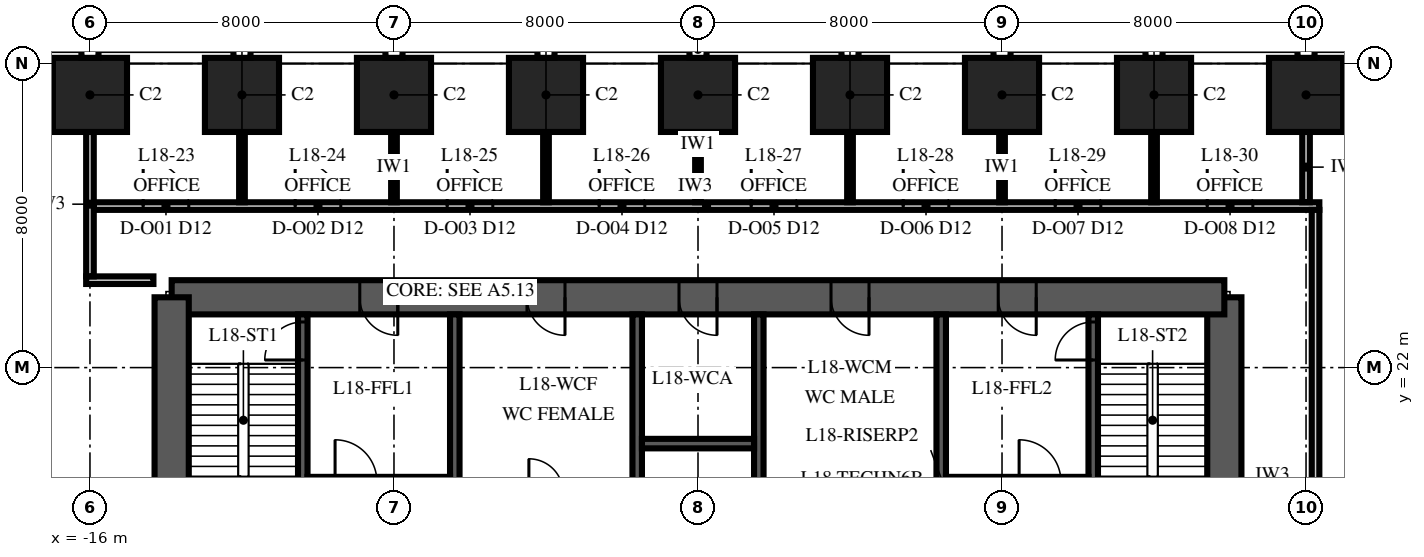
"""IFC4 building model, lengths in metres.
Left out: names, types, materials, properties, quantities, classifications, styles, units other than length and angle.
Written with IfcOpenShell. Run it as: python <this file> out.ifc"""

import sys

from ifc_helpers import new_model, si_unit, direction, frame, frame_2d, origin, origin_2d, place, context, subcontext, project, spatial, polyline, rectangle, outline, extrude, element, fill, save


model = new_model("IFC4")
c1 = context("Model", 3, precision=1e-05, world=origin(), true_north=direction((0.0, 1.0)))
c2 = subcontext(c1, "Body", "Model", "MODEL_VIEW")
j1 = project(units=[si_unit("LENGTHUNIT", "METRE"), si_unit("PLANEANGLEUNIT", "RADIAN")], contexts=[c1])
p1 = place(None, origin())
s1 = spatial("IfcSite", under=j1, at=p1, CompositionType="ELEMENT")
p2 = place(p1, origin())
s2 = spatial("IfcBuilding", under=s1, at=p2, CompositionType="ELEMENT")
p3 = place(p2, frame((0.0, 0.0, 84.0)))
s3 = spatial("IfcBuildingStorey", under=s2, at=p3, CompositionType="ELEMENT", Elevation=84.0)
for number, where, z_axis, x_axis in (
    (1, (16.0, 29.175, 0.0), (0.0, 0.0, 1.0), (-1.0, 0.0, 0.0)),
    (2, (12.0, 29.175, 0.0), (0.0, 0.0, 1.0), (-1.0, 0.0, 0.0)),
    (3, (8.0, 29.175, 0.0), (0.0, 0.0, 1.0), (-1.0, 0.0, 0.0)),
    (4, (4.0, 29.175, 0.0), (0.0, 0.0, 1.0), (-1.0, 0.0, 0.0)),
    (5, (0.0, 29.175, 0.0), (0.0, 0.0, 1.0), (-1.0, 0.0, 0.0)),
    (6, (-4.0, 29.175, 0.0), (0.0, 0.0, 1.0), (-1.0, 0.0, 0.0)),
    (7, (-8.0, 29.175, 0.0), (0.0, 0.0, 1.0), (-1.0, 0.0, 0.0)),
    (8, (-12.0, 29.175, 0.0), (0.0, 0.0, 1.0), (-1.0, 0.0, 0.0)),
    (9, (-16.0, 29.175, 0.0), (0.0, 0.0, 1.0), (-1.0, 0.0, 0.0)),
):
    element("IfcColumn", number, at=place(p3, frame(where, z_axis=z_axis, x_axis=x_axis)), inside=s3, PredefinedType="COLUMN", context=c2, shape_type="SweptSolid", body=[
        extrude(rectangle(XDim=1.95, YDim=1.95, at=origin_2d()), origin(), (0.0, 0.0, 1.0), 4.0),
    ])
p4 = place(p3, frame((13.85, 6.15, 0.0), z_axis=(0.0, 0.0, 1.0), x_axis=(0.0, 1.0, 0.0)))
e10 = element("IfcWall", 10, at=p4, inside=s3, PredefinedType="SHEAR", context=c2, shape_type="SweptSolid", body=[
    extrude(outline(polyline([(0.0, -0.45), (17.7, -0.45), (17.7, 0.0), (17.25, 0.0), (17.25, 0.45), (0.45, 0.45), (0.45, 0.0), (0.0, 0.0), (0.0, -0.45)])), origin(), (0.0, 0.0, 1.0), 4.0),
])
p5 = place(p4, frame((4.15, 0.0, 0.0)))
e11 = element("IfcOpeningElement", 11, at=p5, cuts=e10, PredefinedType="OPENING", context=c2, shape_type="SweptSolid", body=[
    extrude(rectangle(XDim=1.8, YDim=2.4, at=frame_2d((0.9, 1.2))), frame((0.0, 0.465, 0.0), z_axis=(0.0, -1.0, 0.0), x_axis=(1.0, 0.0, 0.0)), (0.0, 0.0, 1.0), 0.93),
])
p6 = place(p3, frame((13.85, 23.85, 0.0), z_axis=(0.0, 0.0, 1.0), x_axis=(-1.0, 0.0, 0.0)))
e12 = element("IfcWall", 12, at=p6, inside=s3, PredefinedType="SHEAR", context=c2, shape_type="SweptSolid", body=[
    extrude(rectangle(XDim=27.7, YDim=0.9, at=frame_2d((13.85, 0.0))), origin(), (0.0, 0.0, 1.0), 4.0),
])
p7 = place(p6, frame((21.75, 0.0, 0.0)))
e13 = element("IfcOpeningElement", 13, at=p7, cuts=e12, PredefinedType="OPENING", context=c2, shape_type="SweptSolid", body=[
    extrude(rectangle(XDim=1.0, YDim=2.1, at=frame_2d((0.5, 1.05))), frame((0.0, 0.465, 0.0), z_axis=(0.0, -1.0, 0.0), x_axis=(1.0, 0.0, 0.0)), (0.0, 0.0, 1.0), 0.93),
])
p8 = place(p6, frame((4.95, 0.0, 0.0)))
e14 = element("IfcOpeningElement", 14, at=p8, cuts=e12, PredefinedType="OPENING", context=c2, shape_type="SweptSolid", body=[
    extrude(rectangle(XDim=1.0, YDim=2.1, at=frame_2d((0.5, 1.05))), frame((0.0, 0.465, 0.0), z_axis=(0.0, -1.0, 0.0), x_axis=(1.0, 0.0, 0.0)), (0.0, 0.0, 1.0), 0.93),
])
p9 = place(p6, frame((17.35, 0.0, 0.0)))
e15 = element("IfcOpeningElement", 15, at=p9, cuts=e12, PredefinedType="OPENING", context=c2, shape_type="SweptSolid", body=[
    extrude(rectangle(XDim=1.0, YDim=2.1, at=frame_2d((0.5, 1.05))), frame((0.0, 0.465, 0.0), z_axis=(0.0, -1.0, 0.0), x_axis=(1.0, 0.0, 0.0)), (0.0, 0.0, 1.0), 0.93),
])
p10 = place(p6, frame((13.35, 0.0, 0.0)))
e16 = element("IfcOpeningElement", 16, at=p10, cuts=e12, PredefinedType="OPENING", context=c2, shape_type="SweptSolid", body=[
    extrude(rectangle(XDim=1.0, YDim=2.1, at=frame_2d((0.5, 1.05))), frame((0.0, 0.465, 0.0), z_axis=(0.0, -1.0, 0.0), x_axis=(1.0, 0.0, 0.0)), (0.0, 0.0, 1.0), 0.93),
])
p11 = place(p6, frame((9.35, 0.0, 0.0)))
e17 = element("IfcOpeningElement", 17, at=p11, cuts=e12, PredefinedType="OPENING", context=c2, shape_type="SweptSolid", body=[
    extrude(rectangle(XDim=1.0, YDim=2.1, at=frame_2d((0.5, 1.05))), frame((0.0, 0.465, 0.0), z_axis=(0.0, -1.0, 0.0), x_axis=(1.0, 0.0, 0.0)), (0.0, 0.0, 1.0), 0.93),
])
p12 = place(p3, frame((-13.85, 23.85, 0.0), z_axis=(0.0, 0.0, 1.0), x_axis=(0.0, -1.0, 0.0)))
e18 = element("IfcWall", 18, at=p12, inside=s3, PredefinedType="SHEAR", context=c2, shape_type="SweptSolid", body=[
    extrude(outline(polyline([(0.0, -0.45), (17.7, -0.45), (17.7, 0.0), (17.25, 0.0), (17.25, 0.45), (0.45, 0.45), (0.45, 0.0), (0.0, 0.0), (0.0, -0.45)])), origin(), (0.0, 0.0, 1.0), 4.0),
])
p13 = place(p12, frame((11.75, 0.0, 0.0)))
e19 = element("IfcOpeningElement", 19, at=p13, cuts=e18, PredefinedType="OPENING", context=c2, shape_type="SweptSolid", body=[
    extrude(rectangle(XDim=1.8, YDim=2.4, at=frame_2d((0.9, 1.2))), frame((0.0, 0.465, 0.0), z_axis=(0.0, -1.0, 0.0), x_axis=(1.0, 0.0, 0.0)), (0.0, 0.0, 1.0), 0.93),
])
p14 = place(p3, frame((-10.4, 16.125, 0.0), z_axis=(0.0, 0.0, 1.0), x_axis=(0.0, 1.0, 0.0)))
e20 = element("IfcWall", 20, at=p14, inside=s3, PredefinedType="SHEAR", context=c2, shape_type="SweptSolid", body=[
    extrude(rectangle(XDim=7.275, YDim=0.25, at=frame_2d((3.637, 0.0))), origin(), (0.0, 0.0, 1.0), 4.0),
])
p15 = place(p14, frame((6.075, 0.0, 0.0)))
e21 = element("IfcOpeningElement", 21, at=p15, cuts=e20, PredefinedType="OPENING", context=c2, shape_type="SweptSolid", body=[
    extrude(rectangle(XDim=1.0, YDim=2.1, at=frame_2d((0.5, 1.05))), frame((0.0, 0.14, 0.0), z_axis=(0.0, -1.0, 0.0), x_axis=(1.0, 0.0, 0.0)), (0.0, 0.0, 1.0), 0.28),
])
for number, where, z_axis, x_axis in (
    (22, (-6.4, 16.125, 0.0), (0.0, 0.0, 1.0), (0.0, 1.0, 0.0)),
    (23, (-1.6, 16.125, 0.0), (0.0, 0.0, 1.0), (0.0, 1.0, 0.0)),
    (24, (1.6, 16.125, 0.0), (0.0, 0.0, 1.0), (0.0, 1.0, 0.0)),
    (25, (6.4, 16.125, 0.0), (0.0, 0.0, 1.0), (0.0, 1.0, 0.0)),
):
    element("IfcWall", number, at=place(p3, frame(where, z_axis=z_axis, x_axis=x_axis)), inside=s3, PredefinedType="SHEAR", context=c2, shape_type="SweptSolid", body=[
        extrude(rectangle(XDim=7.275, YDim=0.25, at=frame_2d((3.637, 0.0))), origin(), (0.0, 0.0, 1.0), 4.0),
    ])
p16 = place(p3, frame((10.4, 16.125, 0.0), z_axis=(0.0, 0.0, 1.0), x_axis=(0.0, 1.0, 0.0)))
e26 = element("IfcWall", 26, at=p16, inside=s3, PredefinedType="SHEAR", context=c2, shape_type="SweptSolid", body=[
    extrude(rectangle(XDim=7.275, YDim=0.25, at=frame_2d((3.637, 0.0))), origin(), (0.0, 0.0, 1.0), 4.0),
])
p17 = place(p16, frame((6.075, 0.0, 0.0)))
e27 = element("IfcOpeningElement", 27, at=p17, cuts=e26, PredefinedType="OPENING", context=c2, shape_type="SweptSolid", body=[
    extrude(rectangle(XDim=1.0, YDim=2.1, at=frame_2d((0.5, 1.05))), frame((0.0, 0.14, 0.0), z_axis=(0.0, -1.0, 0.0), x_axis=(1.0, 0.0, 0.0)), (0.0, 0.0, 1.0), 0.28),
])
p18 = place(p3, frame((-1.475, 20.0, 0.0), z_axis=(0.0, 0.0, 1.0), x_axis=(1.0, 0.0, 0.0)))
e28 = element("IfcWall", 28, at=p18, inside=s3, PredefinedType="SHEAR", context=c2, shape_type="SweptSolid", body=[
    extrude(rectangle(XDim=2.95, YDim=0.25, at=frame_2d((1.475, 0.0))), origin(), (0.0, 0.0, 1.0), 4.0),
])
p19 = place(p3, frame((-16.1, 24.3, 0.0), z_axis=(0.0, 0.0, 1.0), x_axis=(1.0, 0.0, 0.0)))
e29 = element("IfcWall", 29, at=p19, inside=s3, PredefinedType="PARTITIONING", context=c2, shape_type="SweptSolid", body=[
    extrude(rectangle(XDim=1.77, YDim=0.2, at=frame_2d((0.885, 0.0))), origin(), (0.0, 0.0, 1.0), 3.4),
])
p20 = place(p3, frame((-15.9, 26.25, 0.0), z_axis=(0.0, 0.0, 1.0), x_axis=(1.0, 0.0, 0.0)))
e30 = element("IfcWall", 30, at=p20, inside=s3, PredefinedType="PARTITIONING", context=c2, shape_type="SweptSolid", body=[
    extrude(rectangle(XDim=32.25, YDim=0.2, at=frame_2d((16.125, 0.0))), origin(), (0.0, 0.0, 1.0), 3.4),
])
p21 = place(p20, frame((1.3, 0.0, 0.0)))
e31 = element("IfcOpeningElement", 31, at=p21, cuts=e30, PredefinedType="OPENING", context=c2, shape_type="SweptSolid", body=[
    extrude(rectangle(XDim=1.2, YDim=2.4, at=frame_2d((0.6, 1.2))), frame((0.0, 0.115, 0.0), z_axis=(0.0, -1.0, 0.0), x_axis=(1.0, 0.0, 0.0)), (0.0, 0.0, 1.0), 0.23),
])
p22 = place(p20, frame((5.3, 0.0, 0.0)))
e32 = element("IfcOpeningElement", 32, at=p22, cuts=e30, PredefinedType="OPENING", context=c2, shape_type="SweptSolid", body=[
    extrude(rectangle(XDim=1.2, YDim=2.4, at=frame_2d((0.6, 1.2))), frame((0.0, 0.115, 0.0), z_axis=(0.0, -1.0, 0.0), x_axis=(1.0, 0.0, 0.0)), (0.0, 0.0, 1.0), 0.23),
])
p23 = place(p20, frame((9.3, 0.0, 0.0)))
e33 = element("IfcOpeningElement", 33, at=p23, cuts=e30, PredefinedType="OPENING", context=c2, shape_type="SweptSolid", body=[
    extrude(rectangle(XDim=1.2, YDim=2.4, at=frame_2d((0.6, 1.2))), frame((0.0, 0.115, 0.0), z_axis=(0.0, -1.0, 0.0), x_axis=(1.0, 0.0, 0.0)), (0.0, 0.0, 1.0), 0.23),
])
p24 = place(p20, frame((13.3, 0.0, 0.0)))
e34 = element("IfcOpeningElement", 34, at=p24, cuts=e30, PredefinedType="OPENING", context=c2, shape_type="SweptSolid", body=[
    extrude(rectangle(XDim=1.2, YDim=2.4, at=frame_2d((0.6, 1.2))), frame((0.0, 0.115, 0.0), z_axis=(0.0, -1.0, 0.0), x_axis=(1.0, 0.0, 0.0)), (0.0, 0.0, 1.0), 0.23),
])
p25 = place(p20, frame((17.3, 0.0, 0.0)))
e35 = element("IfcOpeningElement", 35, at=p25, cuts=e30, PredefinedType="OPENING", context=c2, shape_type="SweptSolid", body=[
    extrude(rectangle(XDim=1.2, YDim=2.4, at=frame_2d((0.6, 1.2))), frame((0.0, 0.115, 0.0), z_axis=(0.0, -1.0, 0.0), x_axis=(1.0, 0.0, 0.0)), (0.0, 0.0, 1.0), 0.23),
])
p26 = place(p20, frame((21.3, 0.0, 0.0)))
e36 = element("IfcOpeningElement", 36, at=p26, cuts=e30, PredefinedType="OPENING", context=c2, shape_type="SweptSolid", body=[
    extrude(rectangle(XDim=1.2, YDim=2.4, at=frame_2d((0.6, 1.2))), frame((0.0, 0.115, 0.0), z_axis=(0.0, -1.0, 0.0), x_axis=(1.0, 0.0, 0.0)), (0.0, 0.0, 1.0), 0.23),
])
p27 = place(p20, frame((25.3, 0.0, 0.0)))
e37 = element("IfcOpeningElement", 37, at=p27, cuts=e30, PredefinedType="OPENING", context=c2, shape_type="SweptSolid", body=[
    extrude(rectangle(XDim=1.2, YDim=2.4, at=frame_2d((0.6, 1.2))), frame((0.0, 0.115, 0.0), z_axis=(0.0, -1.0, 0.0), x_axis=(1.0, 0.0, 0.0)), (0.0, 0.0, 1.0), 0.23),
])
p28 = place(p20, frame((29.3, 0.0, 0.0)))
e38 = element("IfcOpeningElement", 38, at=p28, cuts=e30, PredefinedType="OPENING", context=c2, shape_type="SweptSolid", body=[
    extrude(rectangle(XDim=1.2, YDim=2.4, at=frame_2d((0.6, 1.2))), frame((0.0, 0.115, 0.0), z_axis=(0.0, -1.0, 0.0), x_axis=(1.0, 0.0, 0.0)), (0.0, 0.0, 1.0), 0.23),
])
p29 = place(p3, frame((-16.0, 24.4, 0.0), z_axis=(0.0, 0.0, 1.0), x_axis=(0.0, 1.0, 0.0)))
e39 = element("IfcWall", 39, at=p29, inside=s3, PredefinedType="PARTITIONING", context=c2, shape_type="SweptSolid", body=[
    extrude(rectangle(XDim=3.8, YDim=0.2, at=frame_2d((1.9, 0.0))), origin(), (0.0, 0.0, 1.0), 3.4),
])
p30 = place(p3, frame((-12.0, 26.35, 0.0), z_axis=(0.0, 0.0, 1.0), x_axis=(0.0, 1.0, 0.0)))
e40 = element("IfcWall", 40, at=p30, inside=s3, PredefinedType="PARTITIONING", context=c2, shape_type="SweptSolid", body=[
    extrude(rectangle(XDim=1.85, YDim=0.15, at=frame_2d((0.925, 0.0))), origin(), (0.0, 0.0, 1.0), 3.85),
])
p31 = place(p3, frame((-8.0, 26.35, 0.0), z_axis=(0.0, 0.0, 1.0), x_axis=(0.0, 1.0, 0.0)))
e41 = element("IfcWall", 41, at=p31, inside=s3, PredefinedType="PARTITIONING", context=c2, shape_type="SweptSolid", body=[
    extrude(rectangle(XDim=1.85, YDim=0.15, at=frame_2d((0.925, 0.0))), origin(), (0.0, 0.0, 1.0), 3.4),
])
p32 = place(p3, frame((-4.0, 26.35, 0.0), z_axis=(0.0, 0.0, 1.0), x_axis=(0.0, 1.0, 0.0)))
e42 = element("IfcWall", 42, at=p32, inside=s3, PredefinedType="PARTITIONING", context=c2, shape_type="SweptSolid", body=[
    extrude(rectangle(XDim=1.85, YDim=0.15, at=frame_2d((0.925, 0.0))), origin(), (0.0, 0.0, 1.0), 3.85),
])
p33 = place(p3, frame((0.0, 26.35, 0.0), z_axis=(0.0, 0.0, 1.0), x_axis=(0.0, 1.0, 0.0)))
e43 = element("IfcWall", 43, at=p33, inside=s3, PredefinedType="PARTITIONING", context=c2, shape_type="SweptSolid", body=[
    extrude(rectangle(XDim=1.85, YDim=0.15, at=frame_2d((0.925, 0.0))), origin(), (0.0, 0.0, 1.0), 3.4),
])
p34 = place(p3, frame((4.0, 26.35, 0.0), z_axis=(0.0, 0.0, 1.0), x_axis=(0.0, 1.0, 0.0)))
e44 = element("IfcWall", 44, at=p34, inside=s3, PredefinedType="PARTITIONING", context=c2, shape_type="SweptSolid", body=[
    extrude(rectangle(XDim=1.85, YDim=0.15, at=frame_2d((0.925, 0.0))), origin(), (0.0, 0.0, 1.0), 3.85),
])
p35 = place(p3, frame((8.0, 26.35, 0.0), z_axis=(0.0, 0.0, 1.0), x_axis=(0.0, 1.0, 0.0)))
e45 = element("IfcWall", 45, at=p35, inside=s3, PredefinedType="PARTITIONING", context=c2, shape_type="SweptSolid", body=[
    extrude(rectangle(XDim=1.85, YDim=0.15, at=frame_2d((0.925, 0.0))), origin(), (0.0, 0.0, 1.0), 3.4),
])
p36 = place(p3, frame((12.0, 26.35, 0.0), z_axis=(0.0, 0.0, 1.0), x_axis=(0.0, 1.0, 0.0)))
e46 = element("IfcWall", 46, at=p36, inside=s3, PredefinedType="PARTITIONING", context=c2, shape_type="SweptSolid", body=[
    extrude(rectangle(XDim=1.85, YDim=0.15, at=frame_2d((0.925, 0.0))), origin(), (0.0, 0.0, 1.0), 3.85),
])
p37 = place(p3, frame((16.0, 26.35, 0.0), z_axis=(0.0, 0.0, 1.0), x_axis=(0.0, 1.0, 0.0)))
e47 = element("IfcWall", 47, at=p37, inside=s3, PredefinedType="PARTITIONING", context=c2, shape_type="SweptSolid", body=[
    extrude(rectangle(XDim=1.85, YDim=0.2, at=frame_2d((0.925, 0.0))), origin(), (0.0, 0.0, 1.0), 3.4),
])
p38 = place(p3, frame((16.25, 9.9, 0.0), z_axis=(0.0, 0.0, 1.0), x_axis=(0.0, 1.0, 0.0)))
e48 = element("IfcWall", 48, at=p38, inside=s3, PredefinedType="PARTITIONING", context=c2, shape_type="SweptSolid", body=[
    extrude(rectangle(XDim=16.25, YDim=0.2, at=frame_2d((8.125, 0.0))), origin(), (0.0, 0.0, 1.0), 3.25),
])
p39 = place(p38, frame((7.95, 0.0, 0.0)))
e49 = element("IfcOpeningElement", 49, at=p39, cuts=e48, PredefinedType="OPENING", context=c2, shape_type="SweptSolid", body=[
    extrude(rectangle(XDim=1.2, YDim=2.4, at=frame_2d((0.6, 1.2))), frame((0.0, 0.115, 0.0), z_axis=(0.0, -1.0, 0.0), x_axis=(1.0, 0.0, 0.0)), (0.0, 0.0, 1.0), 0.23),
])
p40 = place(p7, origin())
e50 = element("IfcDoor", 50, at=p40, inside=s3, OperationType="SINGLE_SWING_RIGHT", PredefinedType="DOOR", context=c2, shape_type="SweptSolid", body=[
    extrude(rectangle(XDim=1.0, YDim=2.1, at=frame_2d((0.5, 1.05))), frame((0.0, 0.45, 0.0), z_axis=(0.0, -1.0, 0.0), x_axis=(1.0, 0.0, 0.0)), (0.0, 0.0, 1.0), 0.899),
])
fill(e13, e50)
p41 = place(p8, origin())
e51 = element("IfcDoor", 51, at=p41, inside=s3, OperationType="SINGLE_SWING_RIGHT", PredefinedType="DOOR", context=c2, shape_type="SweptSolid", body=[
    extrude(rectangle(XDim=1.0, YDim=2.1, at=frame_2d((0.5, 1.05))), frame((0.0, 0.45, 0.0), z_axis=(0.0, -1.0, 0.0), x_axis=(1.0, 0.0, 0.0)), (0.0, 0.0, 1.0), 0.899),
])
fill(e14, e51)
p42 = place(p9, origin())
e52 = element("IfcDoor", 52, at=p42, inside=s3, OperationType="SINGLE_SWING_LEFT", PredefinedType="DOOR", context=c2, shape_type="SweptSolid", body=[
    extrude(rectangle(XDim=1.0, YDim=2.1, at=frame_2d((0.5, 1.05))), frame((0.0, 0.45, 0.0), z_axis=(0.0, -1.0, 0.0), x_axis=(1.0, 0.0, 0.0)), (0.0, 0.0, 1.0), 0.899),
])
fill(e15, e52)
p43 = place(p10, origin())
e53 = element("IfcDoor", 53, at=p43, inside=s3, OperationType="SINGLE_SWING_LEFT", PredefinedType="DOOR", context=c2, shape_type="SweptSolid", body=[
    extrude(rectangle(XDim=1.0, YDim=2.1, at=frame_2d((0.5, 1.05))), frame((0.0, 0.45, 0.0), z_axis=(0.0, -1.0, 0.0), x_axis=(1.0, 0.0, 0.0)), (0.0, 0.0, 1.0), 0.899),
])
fill(e16, e53)
p44 = place(p11, origin())
e54 = element("IfcDoor", 54, at=p44, inside=s3, OperationType="SINGLE_SWING_LEFT", PredefinedType="DOOR", context=c2, shape_type="SweptSolid", body=[
    extrude(rectangle(XDim=1.0, YDim=2.1, at=frame_2d((0.5, 1.05))), frame((0.0, 0.45, 0.0), z_axis=(0.0, -1.0, 0.0), x_axis=(1.0, 0.0, 0.0)), (0.0, 0.0, 1.0), 0.899),
])
fill(e17, e54)
p45 = place(p15, origin())
e55 = element("IfcDoor", 55, at=p45, inside=s3, OperationType="SINGLE_SWING_LEFT", PredefinedType="DOOR", context=c2, shape_type="SweptSolid", body=[
    extrude(rectangle(XDim=1.0, YDim=2.1, at=frame_2d((0.5, 1.05))), frame((0.0, 0.125, 0.0), z_axis=(0.0, -1.0, 0.0), x_axis=(1.0, 0.0, 0.0)), (0.0, 0.0, 1.0), 0.25),
])
fill(e21, e55)
p46 = place(p17, origin())
e56 = element("IfcDoor", 56, at=p46, inside=s3, OperationType="SINGLE_SWING_LEFT", PredefinedType="DOOR", context=c2, shape_type="SweptSolid", body=[
    extrude(rectangle(XDim=1.0, YDim=2.1, at=frame_2d((0.5, 1.05))), frame((0.0, 0.125, 0.0), z_axis=(0.0, -1.0, 0.0), x_axis=(1.0, 0.0, 0.0)), (0.0, 0.0, 1.0), 0.25),
])
fill(e27, e56)
p47 = place(p21, origin())
e57 = element("IfcDoor", 57, at=p47, inside=s3, OperationType="SINGLE_SWING_LEFT", PredefinedType="DOOR", context=c2, shape_type="SweptSolid", body=[
    extrude(rectangle(XDim=1.2, YDim=2.4, at=frame_2d((0.6, 1.2))), frame((0.0, 0.1, 0.0), z_axis=(0.0, -1.0, 0.0), x_axis=(1.0, 0.0, 0.0)), (0.0, 0.0, 1.0), 0.199),
])
fill(e31, e57)
p48 = place(p22, origin())
e58 = element("IfcDoor", 58, at=p48, inside=s3, OperationType="SINGLE_SWING_LEFT", PredefinedType="DOOR", context=c2, shape_type="SweptSolid", body=[
    extrude(rectangle(XDim=1.2, YDim=2.4, at=frame_2d((0.6, 1.2))), frame((0.0, 0.1, 0.0), z_axis=(0.0, -1.0, 0.0), x_axis=(1.0, 0.0, 0.0)), (0.0, 0.0, 1.0), 0.199),
])
fill(e32, e58)
p49 = place(p23, origin())
e59 = element("IfcDoor", 59, at=p49, inside=s3, OperationType="SINGLE_SWING_LEFT", PredefinedType="DOOR", context=c2, shape_type="SweptSolid", body=[
    extrude(rectangle(XDim=1.2, YDim=2.4, at=frame_2d((0.6, 1.2))), frame((0.0, 0.1, 0.0), z_axis=(0.0, -1.0, 0.0), x_axis=(1.0, 0.0, 0.0)), (0.0, 0.0, 1.0), 0.199),
])
fill(e33, e59)
p50 = place(p24, origin())
e60 = element("IfcDoor", 60, at=p50, inside=s3, OperationType="SINGLE_SWING_LEFT", PredefinedType="DOOR", context=c2, shape_type="SweptSolid", body=[
    extrude(rectangle(XDim=1.2, YDim=2.4, at=frame_2d((0.6, 1.2))), frame((0.0, 0.1, 0.0), z_axis=(0.0, -1.0, 0.0), x_axis=(1.0, 0.0, 0.0)), (0.0, 0.0, 1.0), 0.199),
])
fill(e34, e60)
p51 = place(p25, origin())
e61 = element("IfcDoor", 61, at=p51, inside=s3, OperationType="SINGLE_SWING_LEFT", PredefinedType="DOOR", context=c2, shape_type="SweptSolid", body=[
    extrude(rectangle(XDim=1.2, YDim=2.4, at=frame_2d((0.6, 1.2))), frame((0.0, 0.1, 0.0), z_axis=(0.0, -1.0, 0.0), x_axis=(1.0, 0.0, 0.0)), (0.0, 0.0, 1.0), 0.199),
])
fill(e35, e61)
p52 = place(p26, origin())
e62 = element("IfcDoor", 62, at=p52, inside=s3, OperationType="SINGLE_SWING_LEFT", PredefinedType="DOOR", context=c2, shape_type="SweptSolid", body=[
    extrude(rectangle(XDim=1.2, YDim=2.4, at=frame_2d((0.6, 1.2))), frame((0.0, 0.1, 0.0), z_axis=(0.0, -1.0, 0.0), x_axis=(1.0, 0.0, 0.0)), (0.0, 0.0, 1.0), 0.199),
])
fill(e36, e62)
p53 = place(p27, origin())
e63 = element("IfcDoor", 63, at=p53, inside=s3, OperationType="SINGLE_SWING_LEFT", PredefinedType="DOOR", context=c2, shape_type="SweptSolid", body=[
    extrude(rectangle(XDim=1.2, YDim=2.4, at=frame_2d((0.6, 1.2))), frame((0.0, 0.1, 0.0), z_axis=(0.0, -1.0, 0.0), x_axis=(1.0, 0.0, 0.0)), (0.0, 0.0, 1.0), 0.199),
])
fill(e37, e63)
p54 = place(p28, origin())
e64 = element("IfcDoor", 64, at=p54, inside=s3, OperationType="SINGLE_SWING_LEFT", PredefinedType="DOOR", context=c2, shape_type="SweptSolid", body=[
    extrude(rectangle(XDim=1.2, YDim=2.4, at=frame_2d((0.6, 1.2))), frame((0.0, 0.1, 0.0), z_axis=(0.0, -1.0, 0.0), x_axis=(1.0, 0.0, 0.0)), (0.0, 0.0, 1.0), 0.199),
])
fill(e38, e64)
save(model, sys.argv[1])
